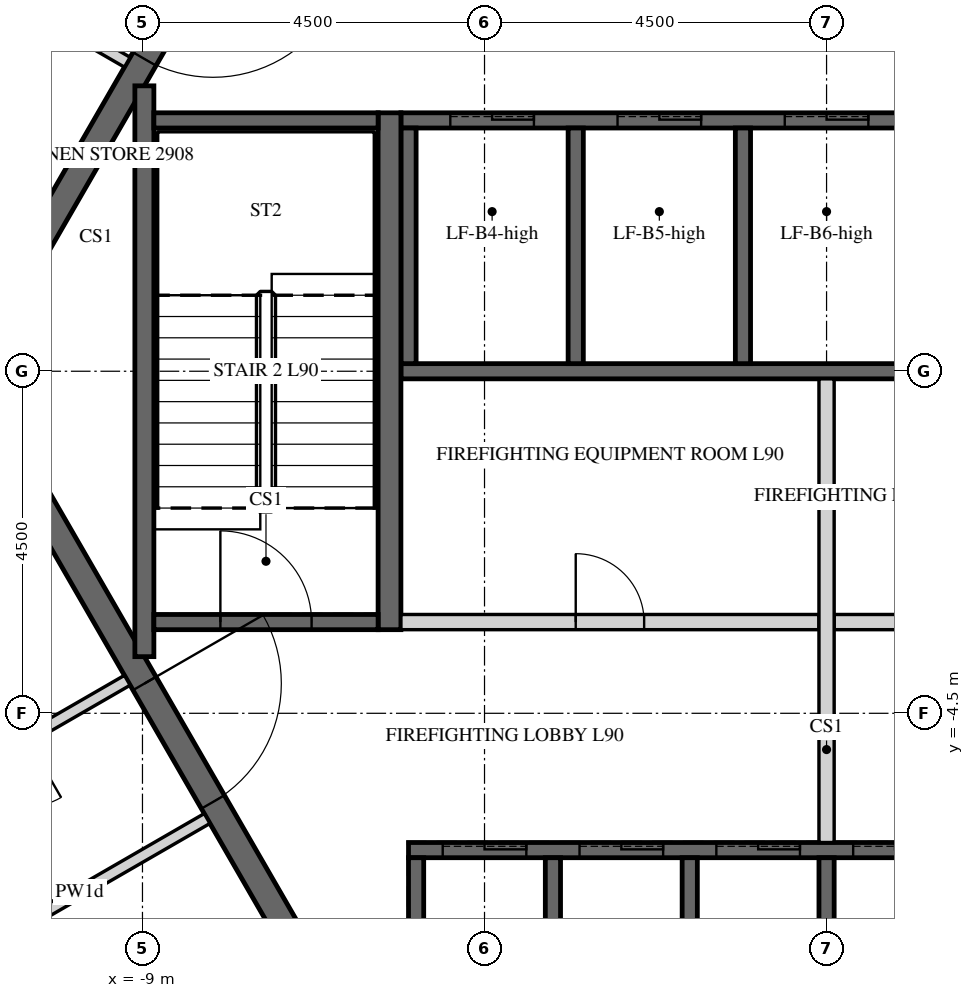
"""IFC4 building model, lengths in metres.
Left out: names, types, materials, properties, quantities, classifications, styles, units other than length and angle.
Written with IfcOpenShell. Run it as: python <this file> out.ifc"""

import sys

from ifc_helpers import new_model, si_unit, direction, frame, frame_2d, origin, place, context, subcontext, project, spatial, polyline, rectangle, outline, extrude, element, fill, save


model = new_model("IFC4")
c1 = context("Model", 3, precision=1e-05, world=origin(), true_north=direction((0.0, 1.0)))
c2 = subcontext(c1, "Body", "Model", "MODEL_VIEW")
j1 = project(units=[si_unit("LENGTHUNIT", "METRE"), si_unit("PLANEANGLEUNIT", "RADIAN")], contexts=[c1])
p1 = place(None, origin())
s1 = spatial("IfcSite", under=j1, at=p1, CompositionType="ELEMENT")
p2 = place(p1, origin())
s2 = spatial("IfcBuilding", under=s1, at=p2, CompositionType="ELEMENT")
p3 = place(p2, frame((0.0, 0.0, 372.9)))
s3 = spatial("IfcBuildingStorey", under=s2, at=p3, CompositionType="ELEMENT", Elevation=372.9)
p4 = place(p3, frame((-5.673, 9.825, -0.15), z_axis=(0.0, 0.0, 1.0), x_axis=(-0.499995046907, -0.866028263435, 0.0)))
e1 = element("IfcWall", 1, at=p4, inside=s3, PredefinedType="SHEAR", context=c2, shape_type="SweptSolid", body=[
    extrude(outline(polyline([(-0.101, -0.175), (11.446, -0.175), (11.244, 0.175), (0.101, 0.175), (-0.101, -0.175)])), origin(), (0.0, 0.0, 1.0), 3.55),
])
p5 = place(p4, frame((4.801, 0.0, 0.15)))
e2 = element("IfcOpeningElement", 2, at=p5, cuts=e1, PredefinedType="OPENING", context=c2, shape_type="SweptSolid", body=[
    extrude(rectangle(XDim=1.8, YDim=2.4, at=frame_2d((0.9, 1.2))), frame((0.0, 0.185, 0.0), z_axis=(0.0, -1.0, 0.0), x_axis=(1.0, 0.0, 0.0)), (0.0, 0.0, 1.0), 0.37),
])
p6 = place(p3, frame((-11.345, 0.0, -0.15), z_axis=(0.0, 0.0, 1.0), x_axis=(0.499995046907, -0.866028263435, 0.0)))
e3 = element("IfcWall", 3, at=p6, inside=s3, PredefinedType="SHEAR", context=c2, shape_type="SweptSolid", body=[
    extrude(outline(polyline([(-0.101, -0.175), (11.446, -0.175), (11.244, 0.175), (0.101, 0.175), (-0.101, -0.175)])), origin(), (0.0, 0.0, 1.0), 3.55),
])
p7 = place(p6, frame((4.744, 0.0, 0.15)))
e4 = element("IfcOpeningElement", 4, at=p7, cuts=e3, PredefinedType="OPENING", context=c2, shape_type="SweptSolid", body=[
    extrude(rectangle(XDim=1.8, YDim=2.4, at=frame_2d((0.9, 1.2))), frame((0.0, 0.185, 0.0), z_axis=(0.0, -1.0, 0.0), x_axis=(1.0, 0.0, 0.0)), (0.0, 0.0, 1.0), 0.37),
])
p8 = place(p3, frame((-5.6, 3.3, -0.25), z_axis=(0.0, 0.0, 1.0), x_axis=(1.0, 0.0, 0.0)))
e5 = element("IfcWall", 5, at=p8, inside=s3, PredefinedType="SHEAR", context=c2, shape_type="SweptSolid", body=[
    extrude(rectangle(XDim=6.6, YDim=0.2, at=frame_2d((3.3, 0.0))), origin(), (0.0, 0.0, 1.0), 3.9),
])
p9 = place(p8, frame((0.65, 0.0, 0.25)))
e6 = element("IfcOpeningElement", 6, at=p9, cuts=e5, PredefinedType="OPENING", context=c2, shape_type="SweptSolid", body=[
    extrude(rectangle(XDim=1.1, YDim=2.1, at=frame_2d((0.55, 1.05))), frame((0.0, 0.11, 0.0), z_axis=(0.0, -1.0, 0.0), x_axis=(1.0, 0.0, 0.0)), (0.0, 0.0, 1.0), 0.22),
])
p10 = place(p8, frame((2.85, 0.0, 0.25)))
e7 = element("IfcOpeningElement", 7, at=p10, cuts=e5, PredefinedType="OPENING", context=c2, shape_type="SweptSolid", body=[
    extrude(rectangle(XDim=1.1, YDim=2.1, at=frame_2d((0.55, 1.05))), frame((0.0, 0.11, 0.0), z_axis=(0.0, -1.0, 0.0), x_axis=(1.0, 0.0, 0.0)), (0.0, 0.0, 1.0), 0.22),
])
p11 = place(p8, frame((5.05, 0.0, 0.25)))
e8 = element("IfcOpeningElement", 8, at=p11, cuts=e5, PredefinedType="OPENING", context=c2, shape_type="SweptSolid", body=[
    extrude(rectangle(XDim=1.1, YDim=2.1, at=frame_2d((0.55, 1.05))), frame((0.0, 0.11, 0.0), z_axis=(0.0, -1.0, 0.0), x_axis=(1.0, 0.0, 0.0)), (0.0, 0.0, 1.0), 0.22),
])
p12 = place(p3, frame((-5.6, 0.0, -0.25), z_axis=(0.0, 0.0, 1.0), x_axis=(1.0, 0.0, 0.0)))
e9 = element("IfcWall", 9, at=p12, inside=s3, PredefinedType="SHEAR", context=c2, shape_type="SweptSolid", body=[
    extrude(rectangle(XDim=11.2, YDim=0.2, at=frame_2d((5.6, 0.0))), origin(), (0.0, 0.0, 1.0), 3.9),
])
for number, where, z_axis, x_axis in (
    (10, (-5.5, 0.1, -0.25), (0.0, 0.0, 1.0), (0.0, 1.0, 0.0)),
    (11, (-3.3, 0.1, -0.25), (0.0, 0.0, 1.0), (0.0, 1.0, 0.0)),
    (12, (-1.1, 0.1, -0.25), (0.0, 0.0, 1.0), (0.0, 1.0, 0.0)),
):
    element("IfcWall", number, at=place(p3, frame(where, z_axis=z_axis, x_axis=x_axis)), inside=s3, PredefinedType="SHEAR", context=c2, shape_type="SweptSolid", body=[
        extrude(rectangle(XDim=3.1, YDim=0.2, at=frame_2d((1.55, 0.0))), origin(), (0.0, 0.0, 1.0), 3.9),
    ])
p13 = place(p3, frame((-5.5, -6.3, -0.25), z_axis=(0.0, 0.0, 1.0), x_axis=(1.0, 0.0, 0.0)))
e13 = element("IfcWall", 13, at=p13, inside=s3, PredefinedType="SHEAR", context=c2, shape_type="SweptSolid", body=[
    extrude(rectangle(XDim=9.2, YDim=0.2, at=frame_2d((4.6, 0.0))), origin(), (0.0, 0.0, 1.0), 3.9),
])
p14 = place(p13, frame((0.45, 0.0, 0.25)))
e14 = element("IfcOpeningElement", 14, at=p14, cuts=e13, PredefinedType="OPENING", context=c2, shape_type="SweptSolid", body=[
    extrude(rectangle(XDim=1.1, YDim=2.1, at=frame_2d((0.55, 1.05))), frame((0.0, 0.11, 0.0), z_axis=(0.0, -1.0, 0.0), x_axis=(1.0, 0.0, 0.0)), (0.0, 0.0, 1.0), 0.22),
])
p15 = place(p13, frame((2.25, 0.0, 0.25)))
e15 = element("IfcOpeningElement", 15, at=p15, cuts=e13, PredefinedType="OPENING", context=c2, shape_type="SweptSolid", body=[
    extrude(rectangle(XDim=1.1, YDim=2.1, at=frame_2d((0.55, 1.05))), frame((0.0, 0.11, 0.0), z_axis=(0.0, -1.0, 0.0), x_axis=(1.0, 0.0, 0.0)), (0.0, 0.0, 1.0), 0.22),
])
p16 = place(p13, frame((4.05, 0.0, 0.25)))
e16 = element("IfcOpeningElement", 16, at=p16, cuts=e13, PredefinedType="OPENING", context=c2, shape_type="SweptSolid", body=[
    extrude(rectangle(XDim=1.1, YDim=2.1, at=frame_2d((0.55, 1.05))), frame((0.0, 0.11, 0.0), z_axis=(0.0, -1.0, 0.0), x_axis=(1.0, 0.0, 0.0)), (0.0, 0.0, 1.0), 0.22),
])
p17 = place(p13, frame((5.85, 0.0, 0.25)))
e17 = element("IfcOpeningElement", 17, at=p17, cuts=e13, PredefinedType="OPENING", context=c2, shape_type="SweptSolid", body=[
    extrude(rectangle(XDim=1.1, YDim=2.1, at=frame_2d((0.55, 1.05))), frame((0.0, 0.11, 0.0), z_axis=(0.0, -1.0, 0.0), x_axis=(1.0, 0.0, 0.0)), (0.0, 0.0, 1.0), 0.22),
])
p18 = place(p13, frame((7.65, 0.0, 0.25)))
e18 = element("IfcOpeningElement", 18, at=p18, cuts=e13, PredefinedType="OPENING", context=c2, shape_type="SweptSolid", body=[
    extrude(rectangle(XDim=1.1, YDim=2.1, at=frame_2d((0.55, 1.05))), frame((0.0, 0.11, 0.0), z_axis=(0.0, -1.0, 0.0), x_axis=(1.0, 0.0, 0.0)), (0.0, 0.0, 1.0), 0.22),
])
for number, where, z_axis, x_axis in (
    (19, (-5.4, -9.3, -0.25), (0.0, 0.0, 1.0), (0.0, 1.0, 0.0)),
    (20, (-3.6, -9.3, -0.25), (0.0, 0.0, 1.0), (0.0, 1.0, 0.0)),
    (21, (-1.8, -9.3, -0.25), (0.0, 0.0, 1.0), (0.0, 1.0, 0.0)),
    (22, (0.0, -9.3, -0.25), (0.0, 0.0, 1.0), (0.0, 1.0, 0.0)),
):
    element("IfcWall", number, at=place(p3, frame(where, z_axis=z_axis, x_axis=x_axis)), inside=s3, PredefinedType="SHEAR", context=c2, shape_type="SweptSolid", body=[
        extrude(rectangle(XDim=2.9, YDim=0.2, at=frame_2d((1.45, 0.0))), origin(), (0.0, 0.0, 1.0), 3.9),
    ])
p19 = place(p3, frame((-5.6, -3.3, 0.0), z_axis=(0.0, 0.0, 1.0), x_axis=(1.0, 0.0, 0.0)))
e23 = element("IfcWall", 23, at=p19, inside=s3, PredefinedType="PARTITIONING", context=c2, shape_type="SweptSolid", body=[
    extrude(rectangle(XDim=5.5, YDim=0.2, at=frame_2d((2.75, 0.0))), origin(), (0.0, 0.0, 1.0), 3.65),
])
p20 = place(p19, frame((2.3, 0.0, 0.0)))
e24 = element("IfcOpeningElement", 24, at=p20, cuts=e23, PredefinedType="OPENING", context=c2, shape_type="SweptSolid", body=[
    extrude(rectangle(XDim=0.9, YDim=2.1, at=frame_2d((0.45, 1.05))), frame((0.0, 0.11, 0.0), z_axis=(0.0, -1.0, 0.0), x_axis=(1.0, 0.0, 0.0)), (0.0, 0.0, 1.0), 0.22),
])
p21 = place(p3, frame((0.1, -3.3, 0.0), z_axis=(0.0, 0.0, 1.0), x_axis=(1.0, 0.0, 0.0)))
e25 = element("IfcWall", 25, at=p21, inside=s3, PredefinedType="PARTITIONING", context=c2, shape_type="SweptSolid", body=[
    extrude(rectangle(XDim=2.85, YDim=0.2, at=frame_2d((1.425, 0.0))), origin(), (0.0, 0.0, 1.0), 3.65),
])
p22 = place(p21, frame((0.875, 0.0, 0.0)))
e26 = element("IfcOpeningElement", 26, at=p22, cuts=e25, PredefinedType="OPENING", context=c2, shape_type="SweptSolid", body=[
    extrude(rectangle(XDim=0.9, YDim=2.1, at=frame_2d((0.45, 1.05))), frame((0.0, 0.11, 0.0), z_axis=(0.0, -1.0, 0.0), x_axis=(1.0, 0.0, 0.0)), (0.0, 0.0, 1.0), 0.22),
])
p23 = place(p3, frame((0.0, -6.2, 0.0), z_axis=(0.0, 0.0, 1.0), x_axis=(0.0, 1.0, 0.0)))
e27 = element("IfcWall", 27, at=p23, inside=s3, PredefinedType="PARTITIONING", context=c2, shape_type="SweptSolid", body=[
    extrude(rectangle(XDim=6.1, YDim=0.2, at=frame_2d((3.05, 0.0))), origin(), (0.0, 0.0, 1.0), 3.65),
])
p24 = place(p3, frame((-5.75, -3.4, -0.25), z_axis=(0.0, 0.0, 1.0), x_axis=(0.0, 1.0, 0.0)))
e28 = element("IfcWall", 28, at=p24, inside=s3, PredefinedType="SHEAR", context=c2, shape_type="SweptSolid", body=[
    extrude(rectangle(XDim=6.8, YDim=0.3, at=frame_2d((3.4, 0.0))), origin(), (0.0, 0.0, 1.0), 3.9),
])
p25 = place(p3, frame((-8.975, -3.755, -0.25), z_axis=(0.0, 0.0, 1.0), x_axis=(0.0, 1.0, 0.0)))
e29 = element("IfcWall", 29, at=p25, inside=s3, PredefinedType="SHEAR", context=c2, shape_type="SweptSolid", body=[
    extrude(rectangle(XDim=7.51, YDim=0.25, at=frame_2d((3.755, 0.0))), origin(), (0.0, 0.0, 1.0), 3.9),
])
p26 = place(p3, frame((-8.85, 3.3, -0.25), z_axis=(0.0, 0.0, 1.0), x_axis=(1.0, 0.0, 0.0)))
e30 = element("IfcWall", 30, at=p26, inside=s3, PredefinedType="SHEAR", context=c2, shape_type="SweptSolid", body=[
    extrude(rectangle(XDim=2.95, YDim=0.2, at=frame_2d((1.475, 0.0))), origin(), (0.0, 0.0, 1.0), 3.9),
])
p27 = place(p3, frame((-8.85, -3.3, -0.25), z_axis=(0.0, 0.0, 1.0), x_axis=(1.0, 0.0, 0.0)))
e31 = element("IfcWall", 31, at=p27, inside=s3, PredefinedType="SHEAR", context=c2, shape_type="SweptSolid", body=[
    extrude(rectangle(XDim=2.95, YDim=0.2, at=frame_2d((1.475, 0.0))), origin(), (0.0, 0.0, 1.0), 3.9),
])
p28 = place(p27, frame((0.875, 0.0, 0.25)))
e32 = element("IfcOpeningElement", 32, at=p28, cuts=e31, PredefinedType="OPENING", context=c2, shape_type="SweptSolid", body=[
    extrude(rectangle(XDim=1.2, YDim=2.4, at=frame_2d((0.6, 1.2))), frame((0.0, 0.11, 0.0), z_axis=(0.0, -1.0, 0.0), x_axis=(1.0, 0.0, 0.0)), (0.0, 0.0, 1.0), 0.22),
])
p29 = place(p3, frame((-7.653, 15.675, 0.0), z_axis=(0.0, 0.0, 1.0), x_axis=(-0.438369669055, -0.898794767037, 0.0)))
e33 = element("IfcWall", 33, at=p29, inside=s3, PredefinedType="PARTITIONING", context=c2, shape_type="SweptSolid", body=[
    extrude(rectangle(XDim=15.243, YDim=0.15, at=frame_2d((7.621, 0.0))), origin(), (0.0, 0.0, 1.0), 2.47),
])
p30 = place(p29, frame((2.942, 0.0, 0.0)))
e34 = element("IfcOpeningElement", 34, at=p30, cuts=e33, PredefinedType="OPENING", context=c2, shape_type="SweptSolid", body=[
    extrude(rectangle(XDim=1.0, YDim=2.1, at=frame_2d((0.5, 1.05))), frame((0.0, 0.085, 0.0), z_axis=(0.0, -1.0, 0.0), x_axis=(1.0, 0.0, 0.0)), (0.0, 0.0, 1.0), 0.17),
])
p31 = place(p3, frame((-10.783, 4.98, 0.0), z_axis=(0.0, 0.0, 1.0), x_axis=(0.866007702746, -0.500030657845, 0.0)))
e35 = element("IfcWall", 35, at=p31, inside=s3, PredefinedType="PARTITIONING", context=c2, shape_type="SweptSolid", body=[
    extrude(rectangle(XDim=1.829, YDim=0.15, at=frame_2d((0.914, 0.0))), origin(), (0.0, 0.0, 1.0), 2.47),
])
p32 = place(p3, frame((-16.583, -2.777, 0.0), z_axis=(0.0, 0.0, 1.0), x_axis=(0.50000467473, -0.866022704811, 0.0)))
e36 = element("IfcWall", 36, at=p32, inside=s3, PredefinedType="PARTITIONING", context=c2, shape_type="SweptSolid", body=[
    extrude(rectangle(XDim=13.504, YDim=0.15, at=frame_2d((6.752, 0.0))), origin(), (0.0, 0.0, 1.0), 2.47),
])
p33 = place(p32, frame((0.925, 0.0, 0.0)))
e37 = element("IfcOpeningElement", 37, at=p33, cuts=e36, PredefinedType="OPENING", context=c2, shape_type="SweptSolid", body=[
    extrude(rectangle(XDim=1.0, YDim=2.1, at=frame_2d((0.5, 1.05))), frame((0.0, 0.085, 0.0), z_axis=(0.0, -1.0, 0.0), x_axis=(1.0, 0.0, 0.0)), (0.0, 0.0, 1.0), 0.17),
])
p34 = place(p3, frame((-9.2, -4.066, 0.0), z_axis=(0.0, 0.0, 1.0), x_axis=(-0.866020906874, -0.500007788796, 0.0)))
e38 = element("IfcWall", 38, at=p34, inside=s3, PredefinedType="PARTITIONING", context=c2, shape_type="SweptSolid", body=[
    extrude(rectangle(XDim=3.95, YDim=0.15, at=frame_2d((1.975, 0.0))), origin(), (0.0, 0.0, 1.0), 2.47),
])
p35 = place(p34, frame((1.525, 0.0, 0.0)))
e39 = element("IfcOpeningElement", 39, at=p35, cuts=e38, PredefinedType="OPENING", context=c2, shape_type="SweptSolid", body=[
    extrude(rectangle(XDim=0.9, YDim=2.1, at=frame_2d((0.45, 1.05))), frame((0.0, 0.085, 0.0), z_axis=(0.0, -1.0, 0.0), x_axis=(1.0, 0.0, 0.0)), (0.0, 0.0, 1.0), 0.17),
])
p36 = place(p3, frame((-11.506, -7.822, 0.0), z_axis=(0.0, 0.0, 1.0), x_axis=(0.866032409438, 0.499987865656, 0.0)))
e40 = element("IfcWall", 40, at=p36, inside=s3, PredefinedType="PARTITIONING", context=c2, shape_type="SweptSolid", body=[
    extrude(rectangle(XDim=3.875, YDim=0.15, at=frame_2d((1.938, 0.0))), origin(), (0.0, 0.0, 1.0), 2.47),
])
p37 = place(p5, origin())
e41 = element("IfcDoor", 41, at=p37, inside=s3, OperationType="DOUBLE_DOOR_SINGLE_SWING", PredefinedType="DOOR", context=c2, shape_type="SweptSolid", body=[
    extrude(rectangle(XDim=1.8, YDim=2.4, at=frame_2d((0.9, 1.2))), frame((0.0, 0.025, 0.0), z_axis=(0.0, -1.0, 0.0), x_axis=(1.0, 0.0, 0.0)), (0.0, 0.0, 1.0), 0.05),
])
fill(e2, e41)
p38 = place(p7, origin())
e42 = element("IfcDoor", 42, at=p38, inside=s3, OperationType="DOUBLE_DOOR_SINGLE_SWING", PredefinedType="DOOR", context=c2, shape_type="SweptSolid", body=[
    extrude(rectangle(XDim=1.8, YDim=2.4, at=frame_2d((0.9, 1.2))), frame((0.0, 0.025, 0.0), z_axis=(0.0, -1.0, 0.0), x_axis=(1.0, 0.0, 0.0)), (0.0, 0.0, 1.0), 0.05),
])
fill(e4, e42)
p39 = place(p20, origin())
e43 = element("IfcDoor", 43, at=p39, inside=s3, OperationType="SINGLE_SWING_LEFT", PredefinedType="DOOR", context=c2, shape_type="SweptSolid", body=[
    extrude(rectangle(XDim=0.9, YDim=2.1, at=frame_2d((0.45, 1.05))), frame((0.0, 0.025, 0.0), z_axis=(0.0, -1.0, 0.0), x_axis=(1.0, 0.0, 0.0)), (0.0, 0.0, 1.0), 0.05),
])
fill(e24, e43)
p40 = place(p28, origin())
e44 = element("IfcDoor", 44, at=p40, inside=s3, OperationType="SINGLE_SWING_LEFT", PredefinedType="DOOR", context=c2, shape_type="SweptSolid", body=[
    extrude(rectangle(XDim=1.2, YDim=2.4, at=frame_2d((0.6, 1.2))), frame((0.0, 0.025, 0.0), z_axis=(0.0, -1.0, 0.0), x_axis=(1.0, 0.0, 0.0)), (0.0, 0.0, 1.0), 0.05),
])
fill(e32, e44)
p41 = place(p9, origin())
e45 = element("IfcDoor", 45, at=p41, inside=s3, OperationType="SLIDING_TO_LEFT", PredefinedType="DOOR", context=c2, shape_type="SweptSolid", body=[
    extrude(rectangle(XDim=1.1, YDim=2.1, at=frame_2d((0.55, 1.05))), frame((0.0, 0.025, 0.0), z_axis=(0.0, -1.0, 0.0), x_axis=(1.0, 0.0, 0.0)), (0.0, 0.0, 1.0), 0.05),
])
fill(e6, e45)
p42 = place(p10, origin())
e46 = element("IfcDoor", 46, at=p42, inside=s3, OperationType="SLIDING_TO_LEFT", PredefinedType="DOOR", context=c2, shape_type="SweptSolid", body=[
    extrude(rectangle(XDim=1.1, YDim=2.1, at=frame_2d((0.55, 1.05))), frame((0.0, 0.025, 0.0), z_axis=(0.0, -1.0, 0.0), x_axis=(1.0, 0.0, 0.0)), (0.0, 0.0, 1.0), 0.05),
])
fill(e7, e46)
p43 = place(p11, origin())
e47 = element("IfcDoor", 47, at=p43, inside=s3, OperationType="SLIDING_TO_LEFT", PredefinedType="DOOR", context=c2, shape_type="SweptSolid", body=[
    extrude(rectangle(XDim=1.1, YDim=2.1, at=frame_2d((0.55, 1.05))), frame((0.0, 0.025, 0.0), z_axis=(0.0, -1.0, 0.0), x_axis=(1.0, 0.0, 0.0)), (0.0, 0.0, 1.0), 0.05),
])
fill(e8, e47)
p44 = place(p14, origin())
e48 = element("IfcDoor", 48, at=p44, inside=s3, OperationType="SLIDING_TO_LEFT", PredefinedType="DOOR", context=c2, shape_type="SweptSolid", body=[
    extrude(rectangle(XDim=1.1, YDim=2.1, at=frame_2d((0.55, 1.05))), frame((0.0, 0.025, 0.0), z_axis=(0.0, -1.0, 0.0), x_axis=(1.0, 0.0, 0.0)), (0.0, 0.0, 1.0), 0.05),
])
fill(e14, e48)
p45 = place(p15, origin())
e49 = element("IfcDoor", 49, at=p45, inside=s3, OperationType="SLIDING_TO_LEFT", PredefinedType="DOOR", context=c2, shape_type="SweptSolid", body=[
    extrude(rectangle(XDim=1.1, YDim=2.1, at=frame_2d((0.55, 1.05))), frame((0.0, 0.025, 0.0), z_axis=(0.0, -1.0, 0.0), x_axis=(1.0, 0.0, 0.0)), (0.0, 0.0, 1.0), 0.05),
])
fill(e15, e49)
p46 = place(p16, origin())
e50 = element("IfcDoor", 50, at=p46, inside=s3, OperationType="SLIDING_TO_LEFT", PredefinedType="DOOR", context=c2, shape_type="SweptSolid", body=[
    extrude(rectangle(XDim=1.1, YDim=2.1, at=frame_2d((0.55, 1.05))), frame((0.0, 0.025, 0.0), z_axis=(0.0, -1.0, 0.0), x_axis=(1.0, 0.0, 0.0)), (0.0, 0.0, 1.0), 0.05),
])
fill(e16, e50)
p47 = place(p17, origin())
e51 = element("IfcDoor", 51, at=p47, inside=s3, OperationType="SLIDING_TO_LEFT", PredefinedType="DOOR", context=c2, shape_type="SweptSolid", body=[
    extrude(rectangle(XDim=1.1, YDim=2.1, at=frame_2d((0.55, 1.05))), frame((0.0, 0.025, 0.0), z_axis=(0.0, -1.0, 0.0), x_axis=(1.0, 0.0, 0.0)), (0.0, 0.0, 1.0), 0.05),
])
fill(e17, e51)
save(model, sys.argv[1])
